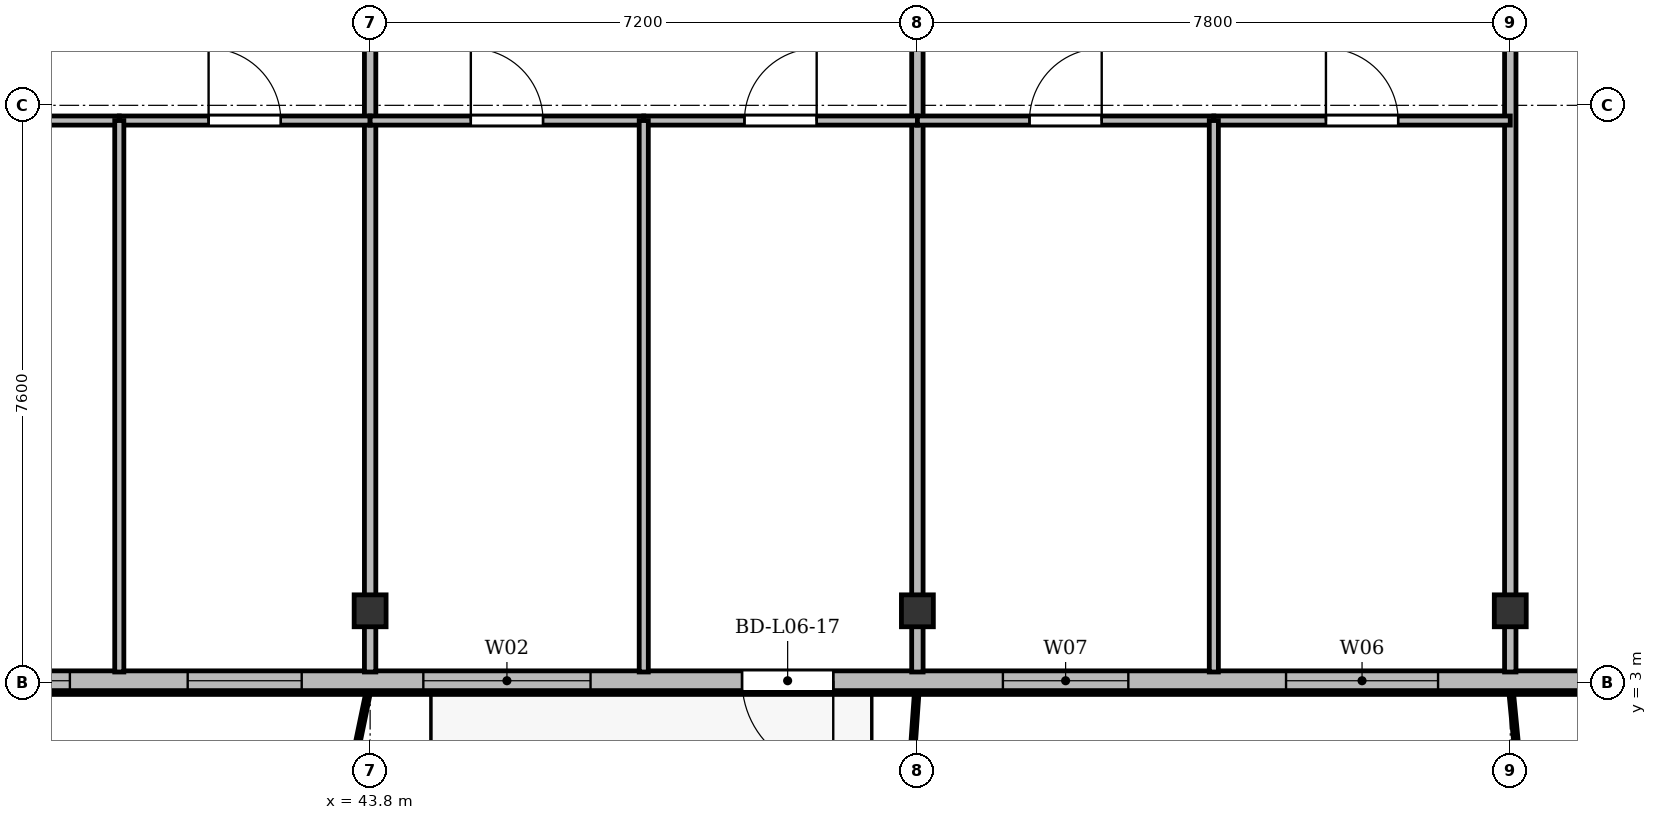
"""IFC4 building model, lengths in metres.
Left out: names, types, materials, properties, quantities, classifications, styles, units other than length and angle.
Written with IfcOpenShell. Run it as: python <this file> out.ifc"""

import sys

from ifc_helpers import new_model, si_unit, direction, frame, frame_2d, origin, origin_2d, place, context, subcontext, project, spatial, rectangle, i_section, extrude, source, transform, mapped, element, fill, save


model = new_model("IFC4")
c1 = context("Model", 3, precision=1e-05, world=origin(), true_north=direction((0.0, 1.0)))
c2 = subcontext(c1, "Body", "Model", "MODEL_VIEW")
j1 = project(units=[si_unit("LENGTHUNIT", "METRE"), si_unit("PLANEANGLEUNIT", "RADIAN")], contexts=[c1])
p1 = place(None, origin())
s1 = spatial("IfcSite", under=j1, at=p1, CompositionType="ELEMENT")
p2 = place(p1, origin())
s2 = spatial("IfcBuilding", under=s1, at=p2, CompositionType="ELEMENT")
p3 = place(p2, frame((0.0, 0.0, 27.1)))
s3 = spatial("IfcBuildingStorey", under=s2, at=p3, CompositionType="ELEMENT", Elevation=27.1)
m1 = source(origin(), c2, "Body", "SweptSolid", [
    extrude(i_section(OverallWidth=0.42, OverallDepth=0.42, WebThickness=0.026, FlangeThickness=0.04, at=origin_2d()), origin(), (0.0, 0.0, 1.0), 3.6),
])
for number, where, z_axis, x_axis in (
    (1, (43.8, 3.95, 0.0), (0.0, 0.0, 1.0), (1.0, 0.0, 0.0)),
    (2, (51.0, 3.95, 0.0), (0.0, 0.0, 1.0), (1.0, 0.0, 0.0)),
    (3, (58.8, 3.95, 0.0), (0.0, 0.0, 1.0), (1.0, 0.0, 0.0)),
):
    element("IfcColumn", number, at=place(p3, frame(where, z_axis=z_axis, x_axis=x_axis)), inside=s3, PredefinedType="COLUMN", context=c2, shape_type="MappedRepresentation", body=[
        mapped(m1, transform((0.0, 0.0, 0.0), x_axis=(1.0, 0.0, 0.0), y_axis=(0.0, 1.0, 0.0), z_axis=(0.0, 0.0, 1.0), scale=1.0)),
    ])
p4 = place(p3, frame((66.9, 3.03, 0.0), z_axis=(0.0, 0.0, 1.0), x_axis=(-1.0, 0.0, 0.0)))
e4 = element("IfcWall", 4, at=p4, inside=s3, PredefinedType="SOLIDWALL", context=c2, shape_type="SweptSolid", body=[
    extrude(rectangle(XDim=59.4, YDim=0.26, at=frame_2d((29.7, 0.0))), origin(), (0.0, 0.0, 1.0), 3.34),
])
p5 = place(p4, frame((3.95, 0.0, 0.9)))
e5 = element("IfcOpeningElement", 5, at=p5, cuts=e4, PredefinedType="OPENING", context=c2, shape_type="SweptSolid", body=[
    extrude(rectangle(XDim=1.5, YDim=1.75, at=frame_2d((0.75, 0.875))), frame((0.0, 0.14, 0.0), z_axis=(0.0, -1.0, 0.0), x_axis=(1.0, 0.0, 0.0)), (0.0, 0.0, 1.0), 0.28),
])
p6 = place(p4, frame((9.05, 0.0, 0.9)))
e6 = element("IfcOpeningElement", 6, at=p6, cuts=e4, PredefinedType="OPENING", context=c2, shape_type="SweptSolid", body=[
    extrude(rectangle(XDim=2.0, YDim=1.95, at=frame_2d((1.0, 0.975))), frame((0.0, 0.14, 0.0), z_axis=(0.0, -1.0, 0.0), x_axis=(1.0, 0.0, 0.0)), (0.0, 0.0, 1.0), 0.28),
])
p7 = place(p4, frame((13.125, 0.0, 0.9)))
e7 = element("IfcOpeningElement", 7, at=p7, cuts=e4, PredefinedType="OPENING", context=c2, shape_type="SweptSolid", body=[
    extrude(rectangle(XDim=1.65, YDim=1.85, at=frame_2d((0.825, 0.925))), frame((0.0, 0.14, 0.0), z_axis=(0.0, -1.0, 0.0), x_axis=(1.0, 0.0, 0.0)), (0.0, 0.0, 1.0), 0.28),
])
p8 = place(p4, frame((17.007, 0.0, 0.0)))
e8 = element("IfcOpeningElement", 8, at=p8, cuts=e4, PredefinedType="OPENING", context=c2, shape_type="SweptSolid", body=[
    extrude(rectangle(XDim=1.2, YDim=2.2, at=frame_2d((0.6, 1.1))), frame((0.0, 0.14, 0.0), z_axis=(0.0, -1.0, 0.0), x_axis=(1.0, 0.0, 0.0)), (0.0, 0.0, 1.0), 0.28),
])
p9 = place(p4, frame((20.2, 0.0, 0.9)))
e9 = element("IfcOpeningElement", 9, at=p9, cuts=e4, PredefinedType="OPENING", context=c2, shape_type="SweptSolid", body=[
    extrude(rectangle(XDim=2.2, YDim=1.8, at=frame_2d((1.1, 0.9))), frame((0.0, 0.14, 0.0), z_axis=(0.0, -1.0, 0.0), x_axis=(1.0, 0.0, 0.0)), (0.0, 0.0, 1.0), 0.28),
])
p10 = place(p4, frame((24.0, 0.0, 0.9)))
e10 = element("IfcOpeningElement", 10, at=p10, cuts=e4, PredefinedType="OPENING", context=c2, shape_type="SweptSolid", body=[
    extrude(rectangle(XDim=1.5, YDim=1.75, at=frame_2d((0.75, 0.875))), frame((0.0, 0.14, 0.0), z_axis=(0.0, -1.0, 0.0), x_axis=(1.0, 0.0, 0.0)), (0.0, 0.0, 1.0), 0.28),
])
p11 = place(p4, frame((27.05, 0.0, 0.9)))
e11 = element("IfcOpeningElement", 11, at=p11, cuts=e4, PredefinedType="OPENING", context=c2, shape_type="SweptSolid", body=[
    extrude(rectangle(XDim=2.0, YDim=1.95, at=frame_2d((1.0, 0.975))), frame((0.0, 0.14, 0.0), z_axis=(0.0, -1.0, 0.0), x_axis=(1.0, 0.0, 0.0)), (0.0, 0.0, 1.0), 0.28),
])
p12 = place(p4, frame((32.175, 0.0, 0.9)))
e12 = element("IfcOpeningElement", 12, at=p12, cuts=e4, PredefinedType="OPENING", context=c2, shape_type="SweptSolid", body=[
    extrude(rectangle(XDim=1.65, YDim=1.85, at=frame_2d((0.825, 0.925))), frame((0.0, 0.14, 0.0), z_axis=(0.0, -1.0, 0.0), x_axis=(1.0, 0.0, 0.0)), (0.0, 0.0, 1.0), 0.28),
])
p13 = place(p4, frame((36.6, 0.0, 0.9)))
e13 = element("IfcOpeningElement", 13, at=p13, cuts=e4, PredefinedType="OPENING", context=c2, shape_type="SweptSolid", body=[
    extrude(rectangle(XDim=1.8, YDim=1.8, at=frame_2d((0.9, 0.9))), frame((0.0, 0.14, 0.0), z_axis=(0.0, -1.0, 0.0), x_axis=(1.0, 0.0, 0.0)), (0.0, 0.0, 1.0), 0.28),
])
p14 = place(p4, frame((39.15, 0.0, 0.9)))
e14 = element("IfcOpeningElement", 14, at=p14, cuts=e4, PredefinedType="OPENING", context=c2, shape_type="SweptSolid", body=[
    extrude(rectangle(XDim=1.5, YDim=1.75, at=frame_2d((0.75, 0.875))), frame((0.0, 0.14, 0.0), z_axis=(0.0, -1.0, 0.0), x_axis=(1.0, 0.0, 0.0)), (0.0, 0.0, 1.0), 0.28),
])
p15 = place(p4, frame((41.55, 0.0, 0.9)))
e15 = element("IfcOpeningElement", 15, at=p15, cuts=e4, PredefinedType="OPENING", context=c2, shape_type="SweptSolid", body=[
    extrude(rectangle(XDim=1.5, YDim=1.75, at=frame_2d((0.75, 0.875))), frame((0.0, 0.14, 0.0), z_axis=(0.0, -1.0, 0.0), x_axis=(1.0, 0.0, 0.0)), (0.0, 0.0, 1.0), 0.28),
])
p16 = place(p4, frame((45.435, 0.0, 0.0)))
e16 = element("IfcOpeningElement", 16, at=p16, cuts=e4, PredefinedType="OPENING", context=c2, shape_type="SweptSolid", body=[
    extrude(rectangle(XDim=1.2, YDim=2.2, at=frame_2d((0.6, 1.1))), frame((0.0, 0.14, 0.0), z_axis=(0.0, -1.0, 0.0), x_axis=(1.0, 0.0, 0.0)), (0.0, 0.0, 1.0), 0.28),
])
p17 = place(p4, frame((48.525, 0.0, 0.9)))
e17 = element("IfcOpeningElement", 17, at=p17, cuts=e4, PredefinedType="OPENING", context=c2, shape_type="SweptSolid", body=[
    extrude(rectangle(XDim=1.65, YDim=1.85, at=frame_2d((0.825, 0.925))), frame((0.0, 0.14, 0.0), z_axis=(0.0, -1.0, 0.0), x_axis=(1.0, 0.0, 0.0)), (0.0, 0.0, 1.0), 0.28),
])
p18 = place(p4, frame((52.1, 0.0, 0.9)))
e18 = element("IfcOpeningElement", 18, at=p18, cuts=e4, PredefinedType="OPENING", context=c2, shape_type="SweptSolid", body=[
    extrude(rectangle(XDim=1.8, YDim=1.8, at=frame_2d((0.9, 0.9))), frame((0.0, 0.14, 0.0), z_axis=(0.0, -1.0, 0.0), x_axis=(1.0, 0.0, 0.0)), (0.0, 0.0, 1.0), 0.28),
])
p19 = place(p4, frame((55.3, 0.0, 0.9)))
e19 = element("IfcOpeningElement", 19, at=p19, cuts=e4, PredefinedType="OPENING", context=c2, shape_type="SweptSolid", body=[
    extrude(rectangle(XDim=2.2, YDim=1.8, at=frame_2d((1.1, 0.9))), frame((0.0, 0.14, 0.0), z_axis=(0.0, -1.0, 0.0), x_axis=(1.0, 0.0, 0.0)), (0.0, 0.0, 1.0), 0.28),
])
for number, where, z_axis, x_axis in (
    (20, (43.8, 3.145, 0.0), (0.0, 0.0, 1.0), (0.0, 1.0, 0.0)),
    (21, (51.0, 3.145, 0.0), (0.0, 0.0, 1.0), (0.0, 1.0, 0.0)),
    (22, (58.8, 3.145, 0.0), (0.0, 0.0, 1.0), (0.0, 1.0, 0.0)),
):
    element("IfcWall", number, at=place(p3, frame(where, z_axis=z_axis, x_axis=x_axis)), inside=s3, PredefinedType="PARTITIONING", context=c2, shape_type="SweptSolid", body=[
        extrude(rectangle(XDim=24.455, YDim=0.15, at=frame_2d((12.228, 0.0))), origin(), (0.0, 0.0, 1.0), 2.752),
    ])
p20 = place(p3, frame((37.2, 10.4, 0.0), z_axis=(0.0, 0.0, 1.0), x_axis=(1.0, 0.0, 0.0)))
e23 = element("IfcWall", 23, at=p20, inside=s3, PredefinedType="PARTITIONING", context=c2, shape_type="SweptSolid", body=[
    extrude(rectangle(XDim=3.3, YDim=0.12, at=frame_2d((1.65, 0.0))), origin(), (0.0, 0.0, 1.0), 3.34),
])
p21 = place(p20, frame((1.175, 0.0, 0.0)))
e24 = element("IfcOpeningElement", 24, at=p21, cuts=e23, PredefinedType="OPENING", context=c2, shape_type="SweptSolid", body=[
    extrude(rectangle(XDim=0.95, YDim=2.15, at=frame_2d((0.475, 1.075))), frame((0.0, 0.07, 0.0), z_axis=(0.0, -1.0, 0.0), x_axis=(1.0, 0.0, 0.0)), (0.0, 0.0, 1.0), 0.14),
])
p22 = place(p3, frame((40.5, 10.4, 0.0), z_axis=(0.0, 0.0, 1.0), x_axis=(1.0, 0.0, 0.0)))
e25 = element("IfcWall", 25, at=p22, inside=s3, PredefinedType="PARTITIONING", context=c2, shape_type="SweptSolid", body=[
    extrude(rectangle(XDim=3.3, YDim=0.12, at=frame_2d((1.65, 0.0))), origin(), (0.0, 0.0, 1.0), 2.752),
])
p23 = place(p22, frame((1.175, 0.0, 0.0)))
e26 = element("IfcOpeningElement", 26, at=p23, cuts=e25, PredefinedType="OPENING", context=c2, shape_type="SweptSolid", body=[
    extrude(rectangle(XDim=0.95, YDim=2.15, at=frame_2d((0.475, 1.075))), frame((0.0, 0.07, 0.0), z_axis=(0.0, -1.0, 0.0), x_axis=(1.0, 0.0, 0.0)), (0.0, 0.0, 1.0), 0.14),
])
p24 = place(p3, frame((40.5, 3.145, 0.0), z_axis=(0.0, 0.0, 1.0), x_axis=(0.0, 1.0, 0.0)))
e27 = element("IfcWall", 27, at=p24, inside=s3, PredefinedType="PARTITIONING", context=c2, shape_type="SweptSolid", body=[
    extrude(rectangle(XDim=7.255, YDim=0.12, at=frame_2d((3.627, 0.0))), origin(), (0.0, 0.0, 1.0), 2.69),
])
p25 = place(p3, frame((43.8, 10.4, 0.0), z_axis=(0.0, 0.0, 1.0), x_axis=(1.0, 0.0, 0.0)))
e28 = element("IfcWall", 28, at=p25, inside=s3, PredefinedType="PARTITIONING", context=c2, shape_type="SweptSolid", body=[
    extrude(rectangle(XDim=3.6, YDim=0.12, at=frame_2d((1.8, 0.0))), origin(), (0.0, 0.0, 1.0), 2.752),
])
p26 = place(p25, frame((1.325, 0.0, 0.0)))
e29 = element("IfcOpeningElement", 29, at=p26, cuts=e28, PredefinedType="OPENING", context=c2, shape_type="SweptSolid", body=[
    extrude(rectangle(XDim=0.95, YDim=2.15, at=frame_2d((0.475, 1.075))), frame((0.0, 0.07, 0.0), z_axis=(0.0, -1.0, 0.0), x_axis=(1.0, 0.0, 0.0)), (0.0, 0.0, 1.0), 0.14),
])
p27 = place(p3, frame((47.4, 10.4, 0.0), z_axis=(0.0, 0.0, 1.0), x_axis=(1.0, 0.0, 0.0)))
e30 = element("IfcWall", 30, at=p27, inside=s3, PredefinedType="PARTITIONING", context=c2, shape_type="SweptSolid", body=[
    extrude(rectangle(XDim=3.6, YDim=0.12, at=frame_2d((1.8, 0.0))), origin(), (0.0, 0.0, 1.0), 2.752),
])
p28 = place(p27, frame((1.325, 0.0, 0.0)))
e31 = element("IfcOpeningElement", 31, at=p28, cuts=e30, PredefinedType="OPENING", context=c2, shape_type="SweptSolid", body=[
    extrude(rectangle(XDim=0.95, YDim=2.15, at=frame_2d((0.475, 1.075))), frame((0.0, 0.07, 0.0), z_axis=(0.0, -1.0, 0.0), x_axis=(1.0, 0.0, 0.0)), (0.0, 0.0, 1.0), 0.14),
])
p29 = place(p3, frame((47.4, 3.145, 0.0), z_axis=(0.0, 0.0, 1.0), x_axis=(0.0, 1.0, 0.0)))
e32 = element("IfcWall", 32, at=p29, inside=s3, PredefinedType="PARTITIONING", context=c2, shape_type="SweptSolid", body=[
    extrude(rectangle(XDim=7.255, YDim=0.12, at=frame_2d((3.627, 0.0))), origin(), (0.0, 0.0, 1.0), 2.69),
])
p30 = place(p3, frame((51.0, 10.4, 0.0), z_axis=(0.0, 0.0, 1.0), x_axis=(1.0, 0.0, 0.0)))
e33 = element("IfcWall", 33, at=p30, inside=s3, PredefinedType="PARTITIONING", context=c2, shape_type="SweptSolid", body=[
    extrude(rectangle(XDim=3.9, YDim=0.12, at=frame_2d((1.95, 0.0))), origin(), (0.0, 0.0, 1.0), 2.752),
])
p31 = place(p30, frame((1.475, 0.0, 0.0)))
e34 = element("IfcOpeningElement", 34, at=p31, cuts=e33, PredefinedType="OPENING", context=c2, shape_type="SweptSolid", body=[
    extrude(rectangle(XDim=0.95, YDim=2.15, at=frame_2d((0.475, 1.075))), frame((0.0, 0.07, 0.0), z_axis=(0.0, -1.0, 0.0), x_axis=(1.0, 0.0, 0.0)), (0.0, 0.0, 1.0), 0.14),
])
p32 = place(p3, frame((54.9, 10.4, 0.0), z_axis=(0.0, 0.0, 1.0), x_axis=(1.0, 0.0, 0.0)))
e35 = element("IfcWall", 35, at=p32, inside=s3, PredefinedType="PARTITIONING", context=c2, shape_type="SweptSolid", body=[
    extrude(rectangle(XDim=3.9, YDim=0.12, at=frame_2d((1.95, 0.0))), origin(), (0.0, 0.0, 1.0), 2.752),
])
p33 = place(p32, frame((1.475, 0.0, 0.0)))
e36 = element("IfcOpeningElement", 36, at=p33, cuts=e35, PredefinedType="OPENING", context=c2, shape_type="SweptSolid", body=[
    extrude(rectangle(XDim=0.95, YDim=2.15, at=frame_2d((0.475, 1.075))), frame((0.0, 0.07, 0.0), z_axis=(0.0, -1.0, 0.0), x_axis=(1.0, 0.0, 0.0)), (0.0, 0.0, 1.0), 0.14),
])
p34 = place(p3, frame((54.9, 3.145, 0.0), z_axis=(0.0, 0.0, 1.0), x_axis=(0.0, 1.0, 0.0)))
e37 = element("IfcWall", 37, at=p34, inside=s3, PredefinedType="PARTITIONING", context=c2, shape_type="SweptSolid", body=[
    extrude(rectangle(XDim=7.255, YDim=0.12, at=frame_2d((3.627, 0.0))), origin(), (0.0, 0.0, 1.0), 2.69),
])
m2 = source(origin(), c2, "Body", "SweptSolid", [
    extrude(rectangle(XDim=2.0, YDim=1.95, at=frame_2d((1.0, 0.975))), frame((0.0, 0.03, 0.0), z_axis=(0.0, -1.0, 0.0), x_axis=(1.0, 0.0, 0.0)), (0.0, 0.0, 1.0), 0.06),
])
p35 = place(p6, origin())
e38 = element("IfcWindow", 38, at=p35, inside=s3, PartitioningType="SINGLE_PANEL", PredefinedType="WINDOW", context=c2, shape_type="MappedRepresentation", body=[
    mapped(m2, transform((0.0, 0.0, 0.0), x_axis=(1.0, 0.0, 0.0), y_axis=(0.0, 1.0, 0.0), z_axis=(0.0, 0.0, 1.0), scale=1.0)),
])
fill(e6, e38)
m3 = source(origin(), c2, "Body", "SweptSolid", [
    extrude(rectangle(XDim=1.65, YDim=1.85, at=frame_2d((0.825, 0.925))), frame((0.0, 0.03, 0.0), z_axis=(0.0, -1.0, 0.0), x_axis=(1.0, 0.0, 0.0)), (0.0, 0.0, 1.0), 0.06),
])
p36 = place(p7, origin())
e39 = element("IfcWindow", 39, at=p36, inside=s3, PartitioningType="SINGLE_PANEL", PredefinedType="WINDOW", context=c2, shape_type="MappedRepresentation", body=[
    mapped(m3, transform((0.0, 0.0, 0.0), x_axis=(1.0, 0.0, 0.0), y_axis=(0.0, 1.0, 0.0), z_axis=(0.0, 0.0, 1.0), scale=1.0)),
])
fill(e7, e39)
m4 = source(origin(), c2, "Body", "SweptSolid", [
    extrude(rectangle(XDim=1.2, YDim=2.2, at=frame_2d((0.6, 1.1))), frame((0.0, 0.025, 0.0), z_axis=(0.0, -1.0, 0.0), x_axis=(1.0, 0.0, 0.0)), (0.0, 0.0, 1.0), 0.05),
])
p37 = place(p8, origin())
e40 = element("IfcDoor", 40, at=p37, inside=s3, OperationType="SINGLE_SWING_LEFT", PredefinedType="DOOR", context=c2, shape_type="MappedRepresentation", body=[
    mapped(m4, transform((0.0, 0.0, 0.0), x_axis=(1.0, 0.0, 0.0), y_axis=(0.0, 1.0, 0.0), z_axis=(0.0, 0.0, 1.0), scale=1.0)),
])
fill(e8, e40)
m5 = source(origin(), c2, "Body", "SweptSolid", [
    extrude(rectangle(XDim=2.2, YDim=1.8, at=frame_2d((1.1, 0.9))), frame((0.0, 0.03, 0.0), z_axis=(0.0, -1.0, 0.0), x_axis=(1.0, 0.0, 0.0)), (0.0, 0.0, 1.0), 0.06),
])
p38 = place(p9, origin())
e41 = element("IfcWindow", 41, at=p38, inside=s3, PartitioningType="SINGLE_PANEL", PredefinedType="WINDOW", context=c2, shape_type="MappedRepresentation", body=[
    mapped(m5, transform((0.0, 0.0, 0.0), x_axis=(1.0, 0.0, 0.0), y_axis=(0.0, 1.0, 0.0), z_axis=(0.0, 0.0, 1.0), scale=1.0)),
])
fill(e9, e41)
m6 = source(origin(), c2, "Body", "SweptSolid", [
    extrude(rectangle(XDim=1.5, YDim=1.75, at=frame_2d((0.75, 0.875))), frame((0.0, 0.03, 0.0), z_axis=(0.0, -1.0, 0.0), x_axis=(1.0, 0.0, 0.0)), (0.0, 0.0, 1.0), 0.06),
])
p39 = place(p10, origin())
e42 = element("IfcWindow", 42, at=p39, inside=s3, PartitioningType="SINGLE_PANEL", PredefinedType="WINDOW", context=c2, shape_type="MappedRepresentation", body=[
    mapped(m6, transform((0.0, 0.0, 0.0), x_axis=(1.0, 0.0, 0.0), y_axis=(0.0, 1.0, 0.0), z_axis=(0.0, 0.0, 1.0), scale=1.0)),
])
fill(e10, e42)
p40 = place(p11, origin())
e43 = element("IfcWindow", 43, at=p40, inside=s3, PartitioningType="SINGLE_PANEL", PredefinedType="WINDOW", context=c2, shape_type="MappedRepresentation", body=[
    mapped(m2, transform((0.0, 0.0, 0.0), x_axis=(1.0, 0.0, 0.0), y_axis=(0.0, 1.0, 0.0), z_axis=(0.0, 0.0, 1.0), scale=1.0)),
])
fill(e11, e43)
m7 = source(origin(), c2, "Body", "SweptSolid", [
    extrude(rectangle(XDim=0.95, YDim=2.15, at=frame_2d((0.475, 1.075))), frame((0.0, 0.025, 0.0), z_axis=(0.0, -1.0, 0.0), x_axis=(1.0, 0.0, 0.0)), (0.0, 0.0, 1.0), 0.05),
])
p41 = place(p23, origin())
e44 = element("IfcDoor", 44, at=p41, inside=s3, OperationType="SINGLE_SWING_LEFT", PredefinedType="DOOR", context=c2, shape_type="MappedRepresentation", body=[
    mapped(m7, transform((0.0, 0.0, 0.0), x_axis=(1.0, 0.0, 0.0), y_axis=(0.0, 1.0, 0.0), z_axis=(0.0, 0.0, 1.0), scale=1.0)),
])
fill(e26, e44)
p42 = place(p26, origin())
e45 = element("IfcDoor", 45, at=p42, inside=s3, OperationType="SINGLE_SWING_LEFT", PredefinedType="DOOR", context=c2, shape_type="MappedRepresentation", body=[
    mapped(m7, transform((0.0, 0.0, 0.0), x_axis=(1.0, 0.0, 0.0), y_axis=(0.0, 1.0, 0.0), z_axis=(0.0, 0.0, 1.0), scale=1.0)),
])
fill(e29, e45)
p43 = place(p28, origin())
e46 = element("IfcDoor", 46, at=p43, inside=s3, OperationType="SINGLE_SWING_RIGHT", PredefinedType="DOOR", context=c2, shape_type="MappedRepresentation", body=[
    mapped(m7, transform((0.0, 0.0, 0.0), x_axis=(1.0, 0.0, 0.0), y_axis=(0.0, 1.0, 0.0), z_axis=(0.0, 0.0, 1.0), scale=1.0)),
])
fill(e31, e46)
p44 = place(p31, origin())
e47 = element("IfcDoor", 47, at=p44, inside=s3, OperationType="SINGLE_SWING_RIGHT", PredefinedType="DOOR", context=c2, shape_type="MappedRepresentation", body=[
    mapped(m7, transform((0.0, 0.0, 0.0), x_axis=(1.0, 0.0, 0.0), y_axis=(0.0, 1.0, 0.0), z_axis=(0.0, 0.0, 1.0), scale=1.0)),
])
fill(e34, e47)
p45 = place(p33, origin())
e48 = element("IfcDoor", 48, at=p45, inside=s3, OperationType="SINGLE_SWING_LEFT", PredefinedType="DOOR", context=c2, shape_type="MappedRepresentation", body=[
    mapped(m7, transform((0.0, 0.0, 0.0), x_axis=(1.0, 0.0, 0.0), y_axis=(0.0, 1.0, 0.0), z_axis=(0.0, 0.0, 1.0), scale=1.0)),
])
fill(e36, e48)
save(model, sys.argv[1])
